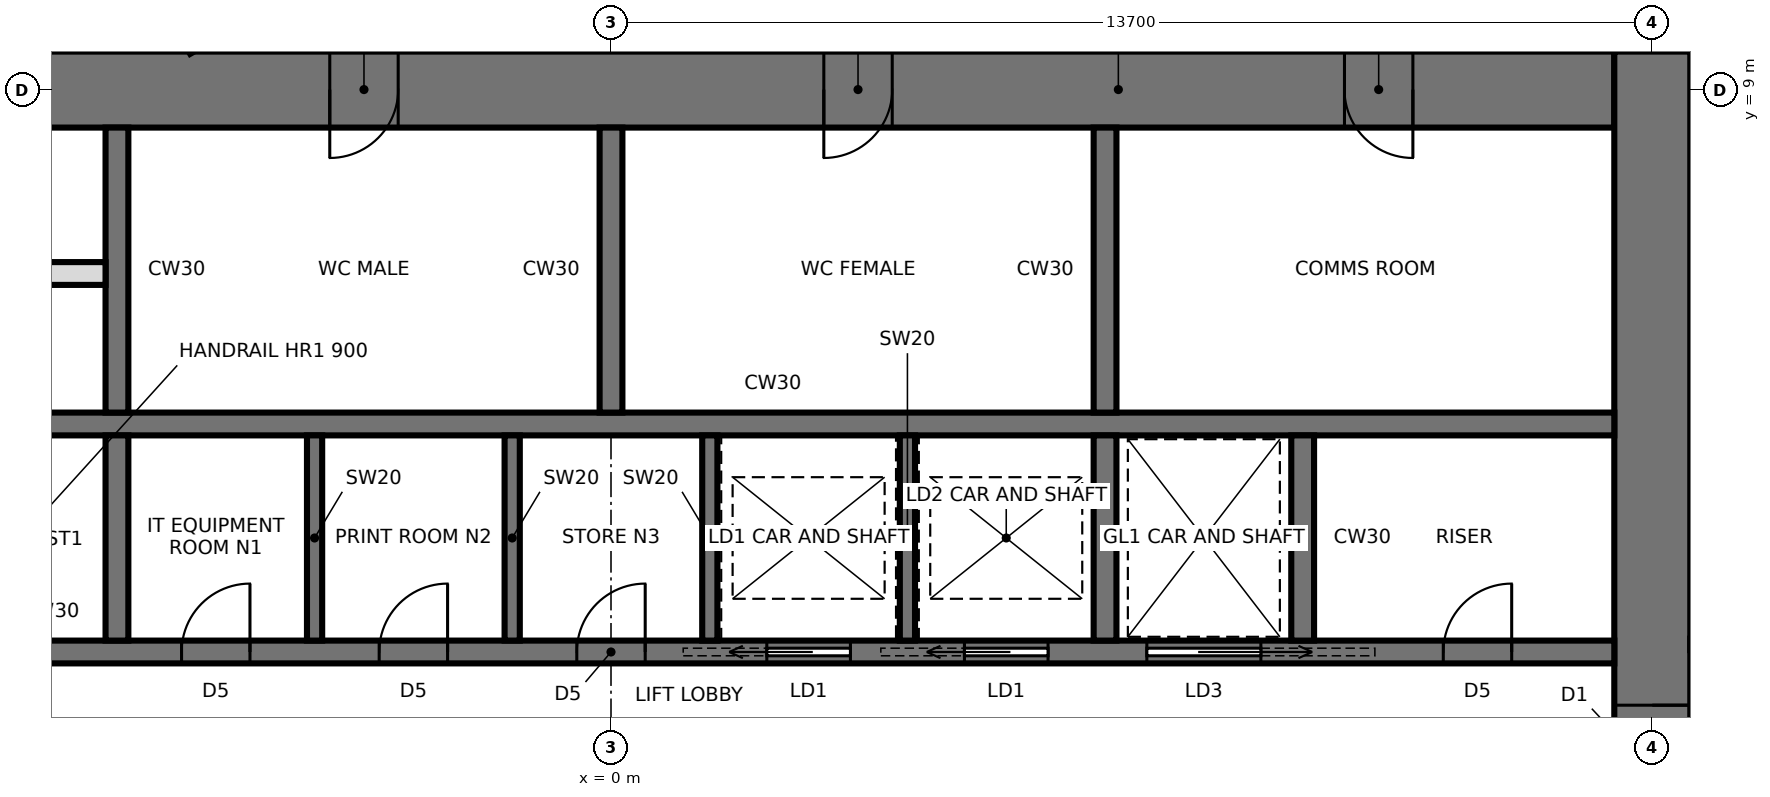
"""IFC4 building model, lengths in metres.
Left out: names, types, materials, properties, quantities, classifications, styles, units other than length and angle.
Written with IfcOpenShell. Run it as: python <this file> out.ifc"""

import sys

from ifc_helpers import new_model, si_unit, direction, frame, frame_2d, origin, place, context, subcontext, project, spatial, rectangle, extrude, element, fill, save


model = new_model("IFC4")
c1 = context("Model", 3, precision=1e-05, world=origin(), true_north=direction((0.0, 1.0)))
c2 = subcontext(c1, "Body", "Model", "MODEL_VIEW")
j1 = project(units=[si_unit("LENGTHUNIT", "METRE"), si_unit("PLANEANGLEUNIT", "RADIAN")], contexts=[c1])
p1 = place(None, origin())
s1 = spatial("IfcSite", under=j1, at=p1, CompositionType="ELEMENT")
p2 = place(p1, origin())
s2 = spatial("IfcBuilding", under=s1, at=p2, CompositionType="ELEMENT")
p3 = place(p2, frame((0.0, 0.0, 256.0)))
s3 = spatial("IfcBuildingStorey", under=s2, at=p3, CompositionType="ELEMENT", Elevation=256.0)
p4 = place(p3, frame((13.2, 9.0, 0.0), z_axis=(0.0, 0.0, 1.0), x_axis=(-1.0, 0.0, 0.0)))
e1 = element("IfcWall", 1, at=p4, inside=s3, PredefinedType="SHEAR", context=c2, shape_type="SweptSolid", body=[
    extrude(rectangle(XDim=26.4, YDim=1.0, at=frame_2d((13.2, 0.0))), origin(), (0.0, 0.0, 1.0), 4.2),
])
p5 = place(p4, frame((2.65, 0.0, 0.0)))
e2 = element("IfcOpeningElement", 2, at=p5, cuts=e1, PredefinedType="OPENING", context=c2, shape_type="SweptSolid", body=[
    extrude(rectangle(XDim=0.9, YDim=2.1, at=frame_2d((0.45, 1.05))), frame((0.0, 0.51, 0.0), z_axis=(0.0, -1.0, 0.0), x_axis=(1.0, 0.0, 0.0)), (0.0, 0.0, 1.0), 1.02),
])
p6 = place(p4, frame((9.5, 0.0, 0.0)))
e3 = element("IfcOpeningElement", 3, at=p6, cuts=e1, PredefinedType="OPENING", context=c2, shape_type="SweptSolid", body=[
    extrude(rectangle(XDim=0.9, YDim=2.1, at=frame_2d((0.45, 1.05))), frame((0.0, 0.51, 0.0), z_axis=(0.0, -1.0, 0.0), x_axis=(1.0, 0.0, 0.0)), (0.0, 0.0, 1.0), 1.02),
])
p7 = place(p4, frame((16.0, 0.0, 0.0)))
e4 = element("IfcOpeningElement", 4, at=p7, cuts=e1, PredefinedType="OPENING", context=c2, shape_type="SweptSolid", body=[
    extrude(rectangle(XDim=0.9, YDim=2.1, at=frame_2d((0.45, 1.05))), frame((0.0, 0.51, 0.0), z_axis=(0.0, -1.0, 0.0), x_axis=(1.0, 0.0, 0.0)), (0.0, 0.0, 1.0), 1.02),
])
p8 = place(p4, frame((21.25, 0.0, 0.0)))
e5 = element("IfcOpeningElement", 5, at=p8, cuts=e1, PredefinedType="OPENING", context=c2, shape_type="SweptSolid", body=[
    extrude(rectangle(XDim=0.9, YDim=2.1, at=frame_2d((0.45, 1.05))), frame((0.0, 0.51, 0.0), z_axis=(0.0, -1.0, 0.0), x_axis=(1.0, 0.0, 0.0)), (0.0, 0.0, 1.0), 1.02),
])
p9 = place(p4, frame((24.8, 0.0, 0.0)))
e6 = element("IfcOpeningElement", 6, at=p9, cuts=e1, PredefinedType="OPENING", context=c2, shape_type="SweptSolid", body=[
    extrude(rectangle(XDim=1.0, YDim=2.1, at=frame_2d((0.5, 1.05))), frame((0.0, 0.51, 0.0), z_axis=(0.0, -1.0, 0.0), x_axis=(1.0, 0.0, 0.0)), (0.0, 0.0, 1.0), 1.02),
])
p10 = place(p3, frame((13.7, -9.5, 0.0), z_axis=(0.0, 0.0, 1.0), x_axis=(0.0, 1.0, 0.0)))
e7 = element("IfcWall", 7, at=p10, inside=s3, PredefinedType="SHEAR", context=c2, shape_type="SweptSolid", body=[
    extrude(rectangle(XDim=19.0, YDim=1.0, at=frame_2d((9.5, 0.0))), origin(), (0.0, 0.0, 1.0), 4.2),
])
p11 = place(p10, frame((8.6, 0.0, 0.0)))
e8 = element("IfcOpeningElement", 8, at=p11, cuts=e7, PredefinedType="OPENING", context=c2, shape_type="SweptSolid", body=[
    extrude(rectangle(XDim=1.8, YDim=2.4, at=frame_2d((0.9, 1.2))), frame((0.0, 0.51, 0.0), z_axis=(0.0, -1.0, 0.0), x_axis=(1.0, 0.0, 0.0)), (0.0, 0.0, 1.0), 1.02),
])
p12 = place(p3, frame((-13.2, 1.6, 0.0), z_axis=(0.0, 0.0, 1.0), x_axis=(1.0, 0.0, 0.0)))
e9 = element("IfcWall", 9, at=p12, inside=s3, PredefinedType="SHEAR", context=c2, shape_type="SweptSolid", body=[
    extrude(rectangle(XDim=26.4, YDim=0.3, at=frame_2d((13.2, 0.0))), origin(), (0.0, 0.0, 1.0), 4.2),
])
p13 = place(p12, frame((0.25, 0.0, 0.0)))
e10 = element("IfcOpeningElement", 10, at=p13, cuts=e9, PredefinedType="OPENING", context=c2, shape_type="SweptSolid", body=[
    extrude(rectangle(XDim=1.0, YDim=2.1, at=frame_2d((0.5, 1.05))), frame((0.0, 0.16, 0.0), z_axis=(0.0, -1.0, 0.0), x_axis=(1.0, 0.0, 0.0)), (0.0, 0.0, 1.0), 0.32),
])
p14 = place(p12, frame((20.25, 0.0, 0.0)))
e11 = element("IfcOpeningElement", 11, at=p14, cuts=e9, PredefinedType="OPENING", context=c2, shape_type="SweptSolid", body=[
    extrude(rectangle(XDim=1.5, YDim=2.4, at=frame_2d((0.75, 1.2))), frame((0.0, 0.16, 0.0), z_axis=(0.0, -1.0, 0.0), x_axis=(1.0, 0.0, 0.0)), (0.0, 0.0, 1.0), 0.32),
])
p15 = place(p12, frame((7.55, 0.0, 0.0)))
e12 = element("IfcOpeningElement", 12, at=p15, cuts=e9, PredefinedType="OPENING", context=c2, shape_type="SweptSolid", body=[
    extrude(rectangle(XDim=0.9, YDim=2.1, at=frame_2d((0.45, 1.05))), frame((0.0, 0.16, 0.0), z_axis=(0.0, -1.0, 0.0), x_axis=(1.0, 0.0, 0.0)), (0.0, 0.0, 1.0), 0.32),
])
p16 = place(p12, frame((10.15, 0.0, 0.0)))
e13 = element("IfcOpeningElement", 13, at=p16, cuts=e9, PredefinedType="OPENING", context=c2, shape_type="SweptSolid", body=[
    extrude(rectangle(XDim=0.9, YDim=2.1, at=frame_2d((0.45, 1.05))), frame((0.0, 0.16, 0.0), z_axis=(0.0, -1.0, 0.0), x_axis=(1.0, 0.0, 0.0)), (0.0, 0.0, 1.0), 0.32),
])
p17 = place(p12, frame((12.75, 0.0, 0.0)))
e14 = element("IfcOpeningElement", 14, at=p17, cuts=e9, PredefinedType="OPENING", context=c2, shape_type="SweptSolid", body=[
    extrude(rectangle(XDim=0.9, YDim=2.1, at=frame_2d((0.45, 1.05))), frame((0.0, 0.16, 0.0), z_axis=(0.0, -1.0, 0.0), x_axis=(1.0, 0.0, 0.0)), (0.0, 0.0, 1.0), 0.32),
])
p18 = place(p12, frame((15.25, 0.0, 0.0)))
e15 = element("IfcOpeningElement", 15, at=p18, cuts=e9, PredefinedType="OPENING", context=c2, shape_type="SweptSolid", body=[
    extrude(rectangle(XDim=1.1, YDim=2.3, at=frame_2d((0.55, 1.15))), frame((0.0, 0.16, 0.0), z_axis=(0.0, -1.0, 0.0), x_axis=(1.0, 0.0, 0.0)), (0.0, 0.0, 1.0), 0.32),
])
p19 = place(p12, frame((17.85, 0.0, 0.0)))
e16 = element("IfcOpeningElement", 16, at=p19, cuts=e9, PredefinedType="OPENING", context=c2, shape_type="SweptSolid", body=[
    extrude(rectangle(XDim=1.1, YDim=2.3, at=frame_2d((0.55, 1.15))), frame((0.0, 0.16, 0.0), z_axis=(0.0, -1.0, 0.0), x_axis=(1.0, 0.0, 0.0)), (0.0, 0.0, 1.0), 0.32),
])
p20 = place(p12, frame((24.15, 0.0, 0.0)))
e17 = element("IfcOpeningElement", 17, at=p20, cuts=e9, PredefinedType="OPENING", context=c2, shape_type="SweptSolid", body=[
    extrude(rectangle(XDim=0.9, YDim=2.1, at=frame_2d((0.45, 1.05))), frame((0.0, 0.16, 0.0), z_axis=(0.0, -1.0, 0.0), x_axis=(1.0, 0.0, 0.0)), (0.0, 0.0, 1.0), 0.32),
])
p21 = place(p3, frame((-13.2, 4.6, 0.0), z_axis=(0.0, 0.0, 1.0), x_axis=(1.0, 0.0, 0.0)))
e18 = element("IfcWall", 18, at=p21, inside=s3, PredefinedType="SHEAR", context=c2, shape_type="SweptSolid", body=[
    extrude(rectangle(XDim=26.4, YDim=0.3, at=frame_2d((13.2, 0.0))), origin(), (0.0, 0.0, 1.0), 4.2),
])
p22 = place(p3, frame((-6.5, 1.75, 0.0), z_axis=(0.0, 0.0, 1.0), x_axis=(0.0, 1.0, 0.0)))
e19 = element("IfcWall", 19, at=p22, inside=s3, PredefinedType="SHEAR", context=c2, shape_type="SweptSolid", body=[
    extrude(rectangle(XDim=2.7, YDim=0.3, at=frame_2d((1.35, 0.0))), origin(), (0.0, 0.0, 1.0), 4.2),
])
p23 = place(p3, frame((-6.5, 4.75, 0.0), z_axis=(0.0, 0.0, 1.0), x_axis=(0.0, 1.0, 0.0)))
e20 = element("IfcWall", 20, at=p23, inside=s3, PredefinedType="SHEAR", context=c2, shape_type="SweptSolid", body=[
    extrude(rectangle(XDim=3.75, YDim=0.3, at=frame_2d((1.875, 0.0))), origin(), (0.0, 0.0, 1.0), 4.2),
])
p24 = place(p3, frame((6.5, 1.75, 0.0), z_axis=(0.0, 0.0, 1.0), x_axis=(0.0, 1.0, 0.0)))
e21 = element("IfcWall", 21, at=p24, inside=s3, PredefinedType="SHEAR", context=c2, shape_type="SweptSolid", body=[
    extrude(rectangle(XDim=2.7, YDim=0.3, at=frame_2d((1.35, 0.0))), origin(), (0.0, 0.0, 1.0), 4.2),
])
p25 = place(p3, frame((6.5, 4.75, 0.0), z_axis=(0.0, 0.0, 1.0), x_axis=(0.0, 1.0, 0.0)))
e22 = element("IfcWall", 22, at=p25, inside=s3, PredefinedType="SHEAR", context=c2, shape_type="SweptSolid", body=[
    extrude(rectangle(XDim=3.75, YDim=0.3, at=frame_2d((1.875, 0.0))), origin(), (0.0, 0.0, 1.0), 4.2),
])
for number, where, z_axis, x_axis in (
    (23, (-3.9, 1.75, 0.0), (0.0, 0.0, 1.0), (0.0, 1.0, 0.0)),
    (24, (-1.3, 1.75, 0.0), (0.0, 0.0, 1.0), (0.0, 1.0, 0.0)),
    (25, (1.3, 1.75, 0.0), (0.0, 0.0, 1.0), (0.0, 1.0, 0.0)),
    (26, (3.9, 1.75, 0.0), (0.0, 0.0, 1.0), (0.0, 1.0, 0.0)),
):
    element("IfcWall", number, at=place(p3, frame(where, z_axis=z_axis, x_axis=x_axis)), inside=s3, PredefinedType="SHEAR", context=c2, shape_type="SweptSolid", body=[
        extrude(rectangle(XDim=2.7, YDim=0.2, at=frame_2d((1.35, 0.0))), origin(), (0.0, 0.0, 1.0), 4.2),
    ])
p26 = place(p3, frame((0.0, 4.75, 0.0), z_axis=(0.0, 0.0, 1.0), x_axis=(0.0, 1.0, 0.0)))
e27 = element("IfcWall", 27, at=p26, inside=s3, PredefinedType="SHEAR", context=c2, shape_type="SweptSolid", body=[
    extrude(rectangle(XDim=3.75, YDim=0.3, at=frame_2d((1.875, 0.0))), origin(), (0.0, 0.0, 1.0), 4.2),
])
p27 = place(p3, frame((9.1, 1.75, 0.0), z_axis=(0.0, 0.0, 1.0), x_axis=(0.0, 1.0, 0.0)))
e28 = element("IfcWall", 28, at=p27, inside=s3, PredefinedType="SHEAR", context=c2, shape_type="SweptSolid", body=[
    extrude(rectangle(XDim=2.7, YDim=0.3, at=frame_2d((1.35, 0.0))), origin(), (0.0, 0.0, 1.0), 4.2),
])
p28 = place(p3, frame((-10.35, 6.58, 0.0), z_axis=(0.0, 0.0, 1.0), x_axis=(1.0, 0.0, 0.0)))
e29 = element("IfcWall", 29, at=p28, inside=s3, PredefinedType="PARTITIONING", context=c2, shape_type="SweptSolid", body=[
    extrude(rectangle(XDim=3.7, YDim=0.3, at=frame_2d((1.85, 0.0))), origin(), (0.0, 0.0, 1.0), 4.04),
])
p29 = place(p28, frame((0.25, 0.0, 0.0)))
e30 = element("IfcOpeningElement", 30, at=p29, cuts=e29, PredefinedType="OPENING", context=c2, shape_type="SweptSolid", body=[
    extrude(rectangle(XDim=1.0, YDim=2.4, at=frame_2d((0.5, 1.2))), frame((0.0, 0.16, 0.0), z_axis=(0.0, -1.0, 0.0), x_axis=(1.0, 0.0, 0.0)), (0.0, 0.0, 1.0), 0.32),
])
p30 = place(p3, frame((19.6, 1.7, 0.0), z_axis=(0.0, 0.0, 1.0), x_axis=(-1.0, 0.0, 0.0)))
e31 = element("IfcWall", 31, at=p30, inside=s3, PredefinedType="PARTITIONING", context=c2, shape_type="SweptSolid", body=[
    extrude(rectangle(XDim=5.4, YDim=0.15, at=frame_2d((2.7, 0.0))), origin(), (0.0, 0.0, 1.0), 4.04),
])
p31 = place(p3, frame((-5.485, 9.5, 0.0), z_axis=(0.0, 0.0, 1.0), x_axis=(-0.499988999718, 0.866031754707, 0.0)))
e32 = element("IfcWall", 32, at=p31, inside=s3, PredefinedType="PARTITIONING", context=c2, shape_type="SweptSolid", body=[
    extrude(rectangle(XDim=9.092, YDim=0.12, at=frame_2d((4.546, 0.0))), origin(), (0.0, 0.0, 1.0), 4.04),
])
p32 = place(p31, frame((2.772, 0.0, 0.0)))
e33 = element("IfcOpeningElement", 33, at=p32, cuts=e32, PredefinedType="OPENING", context=c2, shape_type="SweptSolid", body=[
    extrude(rectangle(XDim=1.0, YDim=2.4, at=frame_2d((0.5, 1.2))), frame((0.0, 0.07, 0.0), z_axis=(0.0, -1.0, 0.0), x_axis=(1.0, 0.0, 0.0)), (0.0, 0.0, 1.0), 0.14),
])
p33 = place(p11, frame((1.8, 0.0, 0.0), z_axis=(0.0, 0.0, 1.0), x_axis=(-1.0, 0.0, 0.0)))
e34 = element("IfcDoor", 34, at=p33, inside=s3, OperationType="DOUBLE_DOOR_SINGLE_SWING", PredefinedType="DOOR", context=c2, shape_type="SweptSolid", body=[
    extrude(rectangle(XDim=1.72, YDim=2.36, at=frame_2d((0.9, 1.18))), frame((0.0, 0.025, 0.0), z_axis=(0.0, -1.0, 0.0), x_axis=(1.0, 0.0, 0.0)), (0.0, 0.0, 1.0), 0.05),
    extrude(rectangle(XDim=0.04, YDim=2.4, at=frame_2d((1.78, 1.2))), frame((0.0, 0.25, 0.0), z_axis=(0.0, -1.0, 0.0), x_axis=(1.0, 0.0, 0.0)), (0.0, 0.0, 1.0), 0.5),
    extrude(rectangle(XDim=0.04, YDim=2.4, at=frame_2d((0.02, 1.2))), frame((0.0, 0.25, 0.0), z_axis=(0.0, -1.0, 0.0), x_axis=(1.0, 0.0, 0.0)), (0.0, 0.0, 1.0), 0.5),
    extrude(rectangle(XDim=1.72, YDim=0.04, at=frame_2d((0.9, 2.38))), frame((0.0, 0.25, 0.0), z_axis=(0.0, -1.0, 0.0), x_axis=(1.0, 0.0, 0.0)), (0.0, 0.0, 1.0), 0.5),
])
fill(e8, e34)
p34 = place(p14, origin())
e35 = element("IfcDoor", 35, at=p34, inside=s3, OperationType="SLIDING_TO_RIGHT", PredefinedType="DOOR", context=c2, shape_type="SweptSolid", body=[
    extrude(rectangle(XDim=1.5, YDim=2.4, at=frame_2d((0.75, 1.2))), frame((0.0, 0.025, 0.0), z_axis=(0.0, -1.0, 0.0), x_axis=(1.0, 0.0, 0.0)), (0.0, 0.0, 1.0), 0.05),
])
fill(e11, e35)
p35 = place(p15, origin())
e36 = element("IfcDoor", 36, at=p35, inside=s3, OperationType="SINGLE_SWING_RIGHT", PredefinedType="DOOR", context=c2, shape_type="SweptSolid", body=[
    extrude(rectangle(XDim=0.9, YDim=2.1, at=frame_2d((0.45, 1.05))), frame((0.0, 0.025, 0.0), z_axis=(0.0, -1.0, 0.0), x_axis=(1.0, 0.0, 0.0)), (0.0, 0.0, 1.0), 0.05),
])
fill(e12, e36)
p36 = place(p16, origin())
e37 = element("IfcDoor", 37, at=p36, inside=s3, OperationType="SINGLE_SWING_RIGHT", PredefinedType="DOOR", context=c2, shape_type="SweptSolid", body=[
    extrude(rectangle(XDim=0.9, YDim=2.1, at=frame_2d((0.45, 1.05))), frame((0.0, 0.025, 0.0), z_axis=(0.0, -1.0, 0.0), x_axis=(1.0, 0.0, 0.0)), (0.0, 0.0, 1.0), 0.05),
])
fill(e13, e37)
p37 = place(p17, origin())
e38 = element("IfcDoor", 38, at=p37, inside=s3, OperationType="SINGLE_SWING_RIGHT", PredefinedType="DOOR", context=c2, shape_type="SweptSolid", body=[
    extrude(rectangle(XDim=0.9, YDim=2.1, at=frame_2d((0.45, 1.05))), frame((0.0, 0.025, 0.0), z_axis=(0.0, -1.0, 0.0), x_axis=(1.0, 0.0, 0.0)), (0.0, 0.0, 1.0), 0.05),
])
fill(e14, e38)
p38 = place(p18, origin())
e39 = element("IfcDoor", 39, at=p38, inside=s3, OperationType="SLIDING_TO_LEFT", PredefinedType="DOOR", context=c2, shape_type="SweptSolid", body=[
    extrude(rectangle(XDim=1.1, YDim=2.3, at=frame_2d((0.55, 1.15))), frame((0.0, 0.025, 0.0), z_axis=(0.0, -1.0, 0.0), x_axis=(1.0, 0.0, 0.0)), (0.0, 0.0, 1.0), 0.05),
])
fill(e15, e39)
p39 = place(p19, origin())
e40 = element("IfcDoor", 40, at=p39, inside=s3, OperationType="SLIDING_TO_LEFT", PredefinedType="DOOR", context=c2, shape_type="SweptSolid", body=[
    extrude(rectangle(XDim=1.1, YDim=2.3, at=frame_2d((0.55, 1.15))), frame((0.0, 0.025, 0.0), z_axis=(0.0, -1.0, 0.0), x_axis=(1.0, 0.0, 0.0)), (0.0, 0.0, 1.0), 0.05),
])
fill(e16, e40)
p40 = place(p20, origin())
e41 = element("IfcDoor", 41, at=p40, inside=s3, OperationType="SINGLE_SWING_RIGHT", PredefinedType="DOOR", context=c2, shape_type="SweptSolid", body=[
    extrude(rectangle(XDim=0.9, YDim=2.1, at=frame_2d((0.45, 1.05))), frame((0.0, 0.025, 0.0), z_axis=(0.0, -1.0, 0.0), x_axis=(1.0, 0.0, 0.0)), (0.0, 0.0, 1.0), 0.05),
])
fill(e17, e41)
p41 = place(p5, origin())
e42 = element("IfcDoor", 42, at=p41, inside=s3, OperationType="SINGLE_SWING_LEFT", PredefinedType="DOOR", context=c2, shape_type="SweptSolid", body=[
    extrude(rectangle(XDim=0.82, YDim=2.06, at=frame_2d((0.45, 1.03))), frame((0.0, 0.025, 0.0), z_axis=(0.0, -1.0, 0.0), x_axis=(1.0, 0.0, 0.0)), (0.0, 0.0, 1.0), 0.05),
    extrude(rectangle(XDim=0.04, YDim=2.1, at=frame_2d((0.02, 1.05))), frame((0.0, 0.25, 0.0), z_axis=(0.0, -1.0, 0.0), x_axis=(1.0, 0.0, 0.0)), (0.0, 0.0, 1.0), 0.5),
    extrude(rectangle(XDim=0.04, YDim=2.1, at=frame_2d((0.88, 1.05))), frame((0.0, 0.25, 0.0), z_axis=(0.0, -1.0, 0.0), x_axis=(1.0, 0.0, 0.0)), (0.0, 0.0, 1.0), 0.5),
    extrude(rectangle(XDim=0.82, YDim=0.04, at=frame_2d((0.45, 2.08))), frame((0.0, 0.25, 0.0), z_axis=(0.0, -1.0, 0.0), x_axis=(1.0, 0.0, 0.0)), (0.0, 0.0, 1.0), 0.5),
])
fill(e2, e42)
p42 = place(p6, origin())
e43 = element("IfcDoor", 43, at=p42, inside=s3, OperationType="SINGLE_SWING_RIGHT", PredefinedType="DOOR", context=c2, shape_type="SweptSolid", body=[
    extrude(rectangle(XDim=0.82, YDim=2.06, at=frame_2d((0.45, 1.03))), frame((0.0, 0.025, 0.0), z_axis=(0.0, -1.0, 0.0), x_axis=(1.0, 0.0, 0.0)), (0.0, 0.0, 1.0), 0.05),
    extrude(rectangle(XDim=0.04, YDim=2.1, at=frame_2d((0.02, 1.05))), frame((0.0, 0.25, 0.0), z_axis=(0.0, -1.0, 0.0), x_axis=(1.0, 0.0, 0.0)), (0.0, 0.0, 1.0), 0.5),
    extrude(rectangle(XDim=0.04, YDim=2.1, at=frame_2d((0.88, 1.05))), frame((0.0, 0.25, 0.0), z_axis=(0.0, -1.0, 0.0), x_axis=(1.0, 0.0, 0.0)), (0.0, 0.0, 1.0), 0.5),
    extrude(rectangle(XDim=0.82, YDim=0.04, at=frame_2d((0.45, 2.08))), frame((0.0, 0.25, 0.0), z_axis=(0.0, -1.0, 0.0), x_axis=(1.0, 0.0, 0.0)), (0.0, 0.0, 1.0), 0.5),
])
fill(e3, e43)
p43 = place(p7, origin())
e44 = element("IfcDoor", 44, at=p43, inside=s3, OperationType="SINGLE_SWING_RIGHT", PredefinedType="DOOR", context=c2, shape_type="SweptSolid", body=[
    extrude(rectangle(XDim=0.82, YDim=2.06, at=frame_2d((0.45, 1.03))), frame((0.0, 0.025, 0.0), z_axis=(0.0, -1.0, 0.0), x_axis=(1.0, 0.0, 0.0)), (0.0, 0.0, 1.0), 0.05),
    extrude(rectangle(XDim=0.04, YDim=2.1, at=frame_2d((0.02, 1.05))), frame((0.0, 0.25, 0.0), z_axis=(0.0, -1.0, 0.0), x_axis=(1.0, 0.0, 0.0)), (0.0, 0.0, 1.0), 0.5),
    extrude(rectangle(XDim=0.04, YDim=2.1, at=frame_2d((0.88, 1.05))), frame((0.0, 0.25, 0.0), z_axis=(0.0, -1.0, 0.0), x_axis=(1.0, 0.0, 0.0)), (0.0, 0.0, 1.0), 0.5),
    extrude(rectangle(XDim=0.82, YDim=0.04, at=frame_2d((0.45, 2.08))), frame((0.0, 0.25, 0.0), z_axis=(0.0, -1.0, 0.0), x_axis=(1.0, 0.0, 0.0)), (0.0, 0.0, 1.0), 0.5),
])
fill(e4, e44)
save(model, sys.argv[1])
